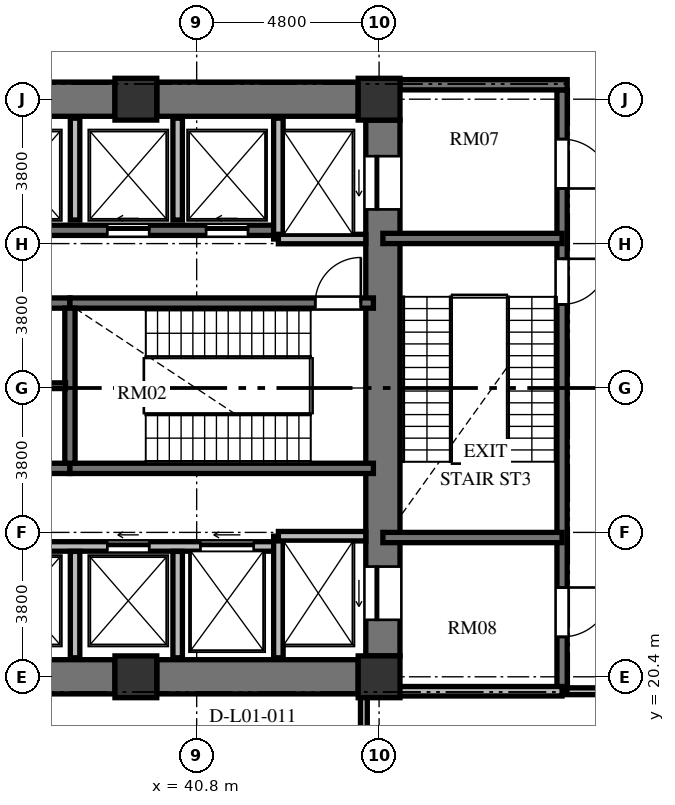
"""IFC4 building model, lengths in metres.
Left out: names, types, materials, properties, quantities, classifications, styles, units other than length and angle.
Written with IfcOpenShell. Run it as: python <this file> out.ifc"""

import sys

from ifc_helpers import new_model, si_unit, direction, frame, frame_2d, origin, origin_2d, place, context, subcontext, project, spatial, rectangle, extrude, element, fill, save


model = new_model("IFC4")
c1 = context("Model", 3, precision=1e-05, world=origin(), true_north=direction((0.0, 1.0)))
c2 = subcontext(c1, "Body", "Model", "MODEL_VIEW")
j1 = project(units=[si_unit("LENGTHUNIT", "METRE"), si_unit("PLANEANGLEUNIT", "RADIAN")], contexts=[c1])
p1 = place(None, origin())
s1 = spatial("IfcSite", under=j1, at=p1, CompositionType="ELEMENT")
p2 = place(p1, origin())
s2 = spatial("IfcBuilding", under=s1, at=p2, CompositionType="ELEMENT")
p3 = place(p2, frame((0.0, 0.0, 6.0)))
s3 = spatial("IfcBuildingStorey", under=s2, at=p3, CompositionType="ELEMENT", Elevation=6.0)
for number, where, z_axis, x_axis in (
    (1, (39.2, 20.4, 0.0), (0.0, 0.0, 1.0), (1.0, 0.0, 0.0)),
    (2, (45.6, 20.4, 0.0), (0.0, 0.0, 1.0), (1.0, 0.0, 0.0)),
    (3, (45.6, 35.6, 0.0), (0.0, 0.0, 1.0), (1.0, 0.0, 0.0)),
    (4, (39.2, 35.6, 0.0), (0.0, 0.0, 1.0), (1.0, 0.0, 0.0)),
):
    element("IfcColumn", number, at=place(p3, frame(where, z_axis=z_axis, x_axis=x_axis)), inside=s3, PredefinedType="COLUMN", context=c2, shape_type="SweptSolid", body=[
        extrude(rectangle(XDim=1.1, YDim=1.1, at=origin_2d()), origin(), (0.0, 0.0, 1.0), 4.8),
    ])
p4 = place(p3, frame((45.7, 20.95, 0.0), z_axis=(0.0, 0.0, 1.0), x_axis=(0.0, 1.0, 0.0)))
e5 = element("IfcWall", 5, at=p4, inside=s3, PredefinedType="SHEAR", context=c2, shape_type="SweptSolid", body=[
    extrude(rectangle(XDim=14.1, YDim=0.9, at=frame_2d((7.05, 0.0))), origin(), (0.0, 0.0, 1.0), 4.8),
])
p5 = place(p4, frame((11.75, 0.0, 0.0)))
e6 = element("IfcOpeningElement", 6, at=p5, cuts=e5, PredefinedType="OPENING", context=c2, shape_type="SweptSolid", body=[
    extrude(rectangle(XDim=1.4, YDim=2.3, at=frame_2d((0.7, 1.15))), frame((0.0, 0.46, 0.0), z_axis=(0.0, -1.0, 0.0), x_axis=(1.0, 0.0, 0.0)), (0.0, 0.0, 1.0), 0.92),
])
p6 = place(p4, frame((0.95, 0.0, 0.0)))
e7 = element("IfcOpeningElement", 7, at=p6, cuts=e5, PredefinedType="OPENING", context=c2, shape_type="SweptSolid", body=[
    extrude(rectangle(XDim=1.4, YDim=2.3, at=frame_2d((0.7, 1.15))), frame((0.0, 0.46, 0.0), z_axis=(0.0, -1.0, 0.0), x_axis=(1.0, 0.0, 0.0)), (0.0, 0.0, 1.0), 0.92),
])
for number, where, z_axis, x_axis in (
    (8, (33.35, 20.4, 0.0), (0.0, 0.0, 1.0), (1.0, 0.0, 0.0)),
    (9, (33.35, 35.6, 0.0), (0.0, 0.0, 1.0), (1.0, 0.0, 0.0)),
):
    element("IfcWall", number, at=place(p3, frame(where, z_axis=z_axis, x_axis=x_axis)), inside=s3, PredefinedType="SHEAR", context=c2, shape_type="SweptSolid", body=[
        extrude(rectangle(XDim=5.3, YDim=0.9, at=frame_2d((2.65, 0.0))), origin(), (0.0, 0.0, 1.0), 4.8),
    ])
for number, where, z_axis, x_axis in (
    (10, (39.75, 20.4, 0.0), (0.0, 0.0, 1.0), (1.0, 0.0, 0.0)),
    (11, (39.75, 35.6, 0.0), (0.0, 0.0, 1.0), (1.0, 0.0, 0.0)),
):
    element("IfcWall", number, at=place(p3, frame(where, z_axis=z_axis, x_axis=x_axis)), inside=s3, PredefinedType="SHEAR", context=c2, shape_type="SweptSolid", body=[
        extrude(rectangle(XDim=5.3, YDim=0.9, at=frame_2d((2.65, 0.0))), origin(), (0.0, 0.0, 1.0), 4.8),
    ])
p7 = place(p3, frame((34.535, 30.235, 0.0), z_axis=(0.0, 0.0, 1.0), x_axis=(1.0, 0.0, 0.0)))
e12 = element("IfcWall", 12, at=p7, inside=s3, PredefinedType="SHEAR", context=c2, shape_type="SweptSolid", body=[
    extrude(rectangle(XDim=2.93, YDim=0.27, at=frame_2d((1.465, 0.0))), origin(), (0.0, 0.0, 1.0), 4.8),
])
p8 = place(p7, frame((0.915, 0.0, 0.0)))
e13 = element("IfcOpeningElement", 13, at=p8, cuts=e12, PredefinedType="OPENING", context=c2, shape_type="SweptSolid", body=[
    extrude(rectangle(XDim=1.1, YDim=2.15, at=frame_2d((0.55, 1.075))), frame((0.0, 0.145, 0.0), z_axis=(0.0, -1.0, 0.0), x_axis=(1.0, 0.0, 0.0)), (0.0, 0.0, 1.0), 0.29),
])
p9 = place(p3, frame((37.465, 30.235, 0.0), z_axis=(0.0, 0.0, 1.0), x_axis=(1.0, 0.0, 0.0)))
e14 = element("IfcWall", 14, at=p9, inside=s3, PredefinedType="SHEAR", context=c2, shape_type="SweptSolid", body=[
    extrude(rectangle(XDim=7.985, YDim=0.27, at=frame_2d((3.992, 0.0))), origin(), (0.0, 0.0, 1.0), 4.8),
])
p10 = place(p9, frame((6.455, 0.0, 0.0)))
e15 = element("IfcOpeningElement", 15, at=p10, cuts=e14, PredefinedType="OPENING", context=c2, shape_type="SweptSolid", body=[
    extrude(rectangle(XDim=1.2, YDim=2.15, at=frame_2d((0.6, 1.075))), frame((0.0, 0.145, 0.0), z_axis=(0.0, -1.0, 0.0), x_axis=(1.0, 0.0, 0.0)), (0.0, 0.0, 1.0), 0.29),
])
p11 = place(p3, frame((34.535, 25.885, 0.0), z_axis=(0.0, 0.0, 1.0), x_axis=(1.0, 0.0, 0.0)))
e16 = element("IfcWall", 16, at=p11, inside=s3, PredefinedType="SHEAR", context=c2, shape_type="SweptSolid", body=[
    extrude(rectangle(XDim=2.93, YDim=0.27, at=frame_2d((1.465, 0.0))), origin(), (0.0, 0.0, 1.0), 4.8),
])
p12 = place(p11, frame((0.94, 0.0, 0.0)))
e17 = element("IfcOpeningElement", 17, at=p12, cuts=e16, PredefinedType="OPENING", context=c2, shape_type="SweptSolid", body=[
    extrude(rectangle(XDim=1.05, YDim=2.15, at=frame_2d((0.525, 1.075))), frame((0.0, 0.145, 0.0), z_axis=(0.0, -1.0, 0.0), x_axis=(1.0, 0.0, 0.0)), (0.0, 0.0, 1.0), 0.29),
])
p13 = place(p3, frame((37.465, 25.885, 0.0), z_axis=(0.0, 0.0, 1.0), x_axis=(1.0, 0.0, 0.0)))
e18 = element("IfcWall", 18, at=p13, inside=s3, PredefinedType="SHEAR", context=c2, shape_type="SweptSolid", body=[
    extrude(rectangle(XDim=7.985, YDim=0.27, at=frame_2d((3.992, 0.0))), origin(), (0.0, 0.0, 1.0), 4.8),
])
p14 = place(p3, frame((37.465, 26.02, 0.0), z_axis=(0.0, 0.0, 1.0), x_axis=(0.0, 1.0, 0.0)))
e19 = element("IfcWall", 19, at=p14, inside=s3, PredefinedType="SHEAR", context=c2, shape_type="SweptSolid", body=[
    extrude(rectangle(XDim=4.08, YDim=0.27, at=frame_2d((2.04, 0.0))), origin(), (0.0, 0.0, 1.0), 4.8),
])
p15 = place(p3, frame((34.65, 28.06, 0.0), z_axis=(0.0, 0.0, 1.0), x_axis=(1.0, 0.0, 0.0)))
e20 = element("IfcWall", 20, at=p15, inside=s3, PredefinedType="PARTITIONING", context=c2, shape_type="SweptSolid", body=[
    extrude(rectangle(XDim=2.7, YDim=0.15, at=frame_2d((1.35, 0.0))), origin(), (0.0, 0.0, 1.0), 4.52),
])
p16 = place(p3, frame((26.55, 32.15, 0.0), z_axis=(0.0, 0.0, 1.0), x_axis=(1.0, 0.0, 0.0)))
e21 = element("IfcWall", 21, at=p16, inside=s3, PredefinedType="SHEAR", context=c2, shape_type="SweptSolid", body=[
    extrude(rectangle(XDim=16.4, YDim=0.27, at=frame_2d((8.2, 0.0))), origin(), (0.0, 0.0, 1.0), 4.8),
])
p17 = place(p16, frame((1.1, 0.0, 0.0)))
e22 = element("IfcOpeningElement", 22, at=p17, cuts=e21, PredefinedType="OPENING", context=c2, shape_type="SweptSolid", body=[
    extrude(rectangle(XDim=1.1, YDim=2.2, at=frame_2d((0.55, 1.1))), frame((0.0, 0.145, 0.0), z_axis=(0.0, -1.0, 0.0), x_axis=(1.0, 0.0, 0.0)), (0.0, 0.0, 1.0), 0.29),
])
p18 = place(p16, frame((3.7, 0.0, 0.0)))
e23 = element("IfcOpeningElement", 23, at=p18, cuts=e21, PredefinedType="OPENING", context=c2, shape_type="SweptSolid", body=[
    extrude(rectangle(XDim=1.1, YDim=2.2, at=frame_2d((0.55, 1.1))), frame((0.0, 0.145, 0.0), z_axis=(0.0, -1.0, 0.0), x_axis=(1.0, 0.0, 0.0)), (0.0, 0.0, 1.0), 0.29),
])
p19 = place(p16, frame((6.5, 0.0, 0.0)))
e24 = element("IfcOpeningElement", 24, at=p19, cuts=e21, PredefinedType="OPENING", context=c2, shape_type="SweptSolid", body=[
    extrude(rectangle(XDim=1.1, YDim=2.2, at=frame_2d((0.55, 1.1))), frame((0.0, 0.145, 0.0), z_axis=(0.0, -1.0, 0.0), x_axis=(1.0, 0.0, 0.0)), (0.0, 0.0, 1.0), 0.29),
])
p20 = place(p16, frame((9.1, 0.0, 0.0)))
e25 = element("IfcOpeningElement", 25, at=p20, cuts=e21, PredefinedType="OPENING", context=c2, shape_type="SweptSolid", body=[
    extrude(rectangle(XDim=1.1, YDim=2.2, at=frame_2d((0.55, 1.1))), frame((0.0, 0.145, 0.0), z_axis=(0.0, -1.0, 0.0), x_axis=(1.0, 0.0, 0.0)), (0.0, 0.0, 1.0), 0.29),
])
p21 = place(p16, frame((11.9, 0.0, 0.0)))
e26 = element("IfcOpeningElement", 26, at=p21, cuts=e21, PredefinedType="OPENING", context=c2, shape_type="SweptSolid", body=[
    extrude(rectangle(XDim=1.1, YDim=2.2, at=frame_2d((0.55, 1.1))), frame((0.0, 0.145, 0.0), z_axis=(0.0, -1.0, 0.0), x_axis=(1.0, 0.0, 0.0)), (0.0, 0.0, 1.0), 0.29),
])
p22 = place(p16, frame((14.5, 0.0, 0.0)))
e27 = element("IfcOpeningElement", 27, at=p22, cuts=e21, PredefinedType="OPENING", context=c2, shape_type="SweptSolid", body=[
    extrude(rectangle(XDim=1.1, YDim=2.2, at=frame_2d((0.55, 1.1))), frame((0.0, 0.145, 0.0), z_axis=(0.0, -1.0, 0.0), x_axis=(1.0, 0.0, 0.0)), (0.0, 0.0, 1.0), 0.29),
])
p23 = place(p3, frame((26.75, 23.83, 0.0), z_axis=(0.0, 0.0, 1.0), x_axis=(1.0, 0.0, 0.0)))
e28 = element("IfcWall", 28, at=p23, inside=s3, PredefinedType="SOLIDWALL", context=c2, shape_type="SweptSolid", body=[
    extrude(rectangle(XDim=16.2, YDim=0.25, at=frame_2d((8.1, 0.0))), origin(), (0.0, 0.0, 1.0), 4.52),
])
p24 = place(p23, frame((0.9, 0.0, 0.0)))
e29 = element("IfcOpeningElement", 29, at=p24, cuts=e28, PredefinedType="OPENING", context=c2, shape_type="SweptSolid", body=[
    extrude(rectangle(XDim=1.1, YDim=2.2, at=frame_2d((0.55, 1.1))), frame((0.0, 0.135, 0.0), z_axis=(0.0, -1.0, 0.0), x_axis=(1.0, 0.0, 0.0)), (0.0, 0.0, 1.0), 0.27),
])
p25 = place(p23, frame((3.5, 0.0, 0.0)))
e30 = element("IfcOpeningElement", 30, at=p25, cuts=e28, PredefinedType="OPENING", context=c2, shape_type="SweptSolid", body=[
    extrude(rectangle(XDim=1.1, YDim=2.2, at=frame_2d((0.55, 1.1))), frame((0.0, 0.135, 0.0), z_axis=(0.0, -1.0, 0.0), x_axis=(1.0, 0.0, 0.0)), (0.0, 0.0, 1.0), 0.27),
])
p26 = place(p23, frame((6.3, 0.0, 0.0)))
e31 = element("IfcOpeningElement", 31, at=p26, cuts=e28, PredefinedType="OPENING", context=c2, shape_type="SweptSolid", body=[
    extrude(rectangle(XDim=1.1, YDim=2.2, at=frame_2d((0.55, 1.1))), frame((0.0, 0.135, 0.0), z_axis=(0.0, -1.0, 0.0), x_axis=(1.0, 0.0, 0.0)), (0.0, 0.0, 1.0), 0.27),
])
p27 = place(p23, frame((8.9, 0.0, 0.0)))
e32 = element("IfcOpeningElement", 32, at=p27, cuts=e28, PredefinedType="OPENING", context=c2, shape_type="SweptSolid", body=[
    extrude(rectangle(XDim=1.1, YDim=2.2, at=frame_2d((0.55, 1.1))), frame((0.0, 0.135, 0.0), z_axis=(0.0, -1.0, 0.0), x_axis=(1.0, 0.0, 0.0)), (0.0, 0.0, 1.0), 0.27),
])
p28 = place(p23, frame((11.7, 0.0, 0.0)))
e33 = element("IfcOpeningElement", 33, at=p28, cuts=e28, PredefinedType="OPENING", context=c2, shape_type="SweptSolid", body=[
    extrude(rectangle(XDim=1.1, YDim=2.2, at=frame_2d((0.55, 1.1))), frame((0.0, 0.135, 0.0), z_axis=(0.0, -1.0, 0.0), x_axis=(1.0, 0.0, 0.0)), (0.0, 0.0, 1.0), 0.27),
])
p29 = place(p23, frame((14.15, 0.0, 0.0)))
e34 = element("IfcOpeningElement", 34, at=p29, cuts=e28, PredefinedType="OPENING", context=c2, shape_type="SweptSolid", body=[
    extrude(rectangle(XDim=1.4, YDim=2.3, at=frame_2d((0.7, 1.15))), frame((0.0, 0.135, 0.0), z_axis=(0.0, -1.0, 0.0), x_axis=(1.0, 0.0, 0.0)), (0.0, 0.0, 1.0), 0.27),
])
p30 = place(p3, frame((42.95, 31.92, 0.0), z_axis=(0.0, 0.0, 1.0), x_axis=(0.0, 1.0, 0.0)))
e35 = element("IfcWall", 35, at=p30, inside=s3, PredefinedType="SOLIDWALL", context=c2, shape_type="SweptSolid", body=[
    extrude(rectangle(XDim=3.18, YDim=0.25, at=frame_2d((1.59, 0.0))), origin(), (0.0, 0.0, 1.0), 4.52),
])
p31 = place(p3, frame((42.95, 31.92, 0.0), z_axis=(0.0, 0.0, 1.0), x_axis=(1.0, 0.0, 0.0)))
e36 = element("IfcWall", 36, at=p31, inside=s3, PredefinedType="SOLIDWALL", context=c2, shape_type="SweptSolid", body=[
    extrude(rectangle(XDim=2.3, YDim=0.25, at=frame_2d((1.15, 0.0))), origin(), (0.0, 0.0, 1.0), 4.52),
])
p32 = place(p3, frame((42.95, 20.9, 0.0), z_axis=(0.0, 0.0, 1.0), x_axis=(0.0, 1.0, 0.0)))
e37 = element("IfcWall", 37, at=p32, inside=s3, PredefinedType="SOLIDWALL", context=c2, shape_type="SweptSolid", body=[
    extrude(rectangle(XDim=3.2, YDim=0.25, at=frame_2d((1.6, 0.0))), origin(), (0.0, 0.0, 1.0), 4.52),
])
p33 = place(p3, frame((42.95, 24.1, 0.0), z_axis=(0.0, 0.0, 1.0), x_axis=(1.0, 0.0, 0.0)))
e38 = element("IfcWall", 38, at=p33, inside=s3, PredefinedType="SOLIDWALL", context=c2, shape_type="SweptSolid", body=[
    extrude(rectangle(XDim=2.3, YDim=0.25, at=frame_2d((1.15, 0.0))), origin(), (0.0, 0.0, 1.0), 4.52),
])
p34 = place(p3, frame((37.6, 32.42, 0.0), z_axis=(0.0, 0.0, 1.0), x_axis=(0.0, 1.0, 0.0)))
e39 = element("IfcWall", 39, at=p34, inside=s3, PredefinedType="SOLIDWALL", context=c2, shape_type="SweptSolid", body=[
    extrude(rectangle(XDim=2.68, YDim=0.25, at=frame_2d((1.34, 0.0))), origin(), (0.0, 0.0, 1.0), 4.52),
])
p35 = place(p3, frame((37.6, 20.9, 0.0), z_axis=(0.0, 0.0, 1.0), x_axis=(0.0, 1.0, 0.0)))
e40 = element("IfcWall", 40, at=p35, inside=s3, PredefinedType="SOLIDWALL", context=c2, shape_type="SweptSolid", body=[
    extrude(rectangle(XDim=2.8, YDim=0.25, at=frame_2d((1.4, 0.0))), origin(), (0.0, 0.0, 1.0), 4.52),
])
p36 = place(p3, frame((40.3, 32.42, 0.0), z_axis=(0.0, 0.0, 1.0), x_axis=(0.0, 1.0, 0.0)))
e41 = element("IfcWall", 41, at=p36, inside=s3, PredefinedType="SOLIDWALL", context=c2, shape_type="SweptSolid", body=[
    extrude(rectangle(XDim=2.68, YDim=0.25, at=frame_2d((1.34, 0.0))), origin(), (0.0, 0.0, 1.0), 4.52),
])
p37 = place(p3, frame((40.3, 20.9, 0.0), z_axis=(0.0, 0.0, 1.0), x_axis=(0.0, 1.0, 0.0)))
e42 = element("IfcWall", 42, at=p37, inside=s3, PredefinedType="SOLIDWALL", context=c2, shape_type="SweptSolid", body=[
    extrude(rectangle(XDim=2.8, YDim=0.25, at=frame_2d((1.4, 0.0))), origin(), (0.0, 0.0, 1.0), 4.52),
])
p38 = place(p3, frame((50.415, 35.845, 0.0), z_axis=(0.0, 0.0, 1.0), x_axis=(0.0, -1.0, 0.0)))
e43 = element("IfcWall", 43, at=p38, inside=s3, PredefinedType="SHEAR", context=c2, shape_type="SweptSolid", body=[
    extrude(rectangle(XDim=15.825, YDim=0.27, at=frame_2d((7.913, 0.0))), origin(), (0.0, 0.0, 1.0), 4.8),
])
p39 = place(p38, frame((4.445, 0.0, 0.0)))
e44 = element("IfcOpeningElement", 44, at=p39, cuts=e43, PredefinedType="OPENING", context=c2, shape_type="SweptSolid", body=[
    extrude(rectangle(XDim=1.2, YDim=2.15, at=frame_2d((0.6, 1.075))), frame((0.0, 0.145, 0.0), z_axis=(0.0, -1.0, 0.0), x_axis=(1.0, 0.0, 0.0)), (0.0, 0.0, 1.0), 0.29),
])
p40 = place(p38, frame((1.295, 0.0, 0.0)))
e45 = element("IfcOpeningElement", 45, at=p40, cuts=e43, PredefinedType="OPENING", context=c2, shape_type="SweptSolid", body=[
    extrude(rectangle(XDim=1.3, YDim=2.2, at=frame_2d((0.65, 1.1))), frame((0.0, 0.145, 0.0), z_axis=(0.0, -1.0, 0.0), x_axis=(1.0, 0.0, 0.0)), (0.0, 0.0, 1.0), 0.29),
])
p41 = place(p38, frame((13.095, 0.0, 0.0)))
e46 = element("IfcOpeningElement", 46, at=p41, cuts=e43, PredefinedType="OPENING", context=c2, shape_type="SweptSolid", body=[
    extrude(rectangle(XDim=1.3, YDim=2.2, at=frame_2d((0.65, 1.1))), frame((0.0, 0.145, 0.0), z_axis=(0.0, -1.0, 0.0), x_axis=(1.0, 0.0, 0.0)), (0.0, 0.0, 1.0), 0.29),
])
p42 = place(p3, frame((46.15, 35.98, 0.0), z_axis=(0.0, 0.0, 1.0), x_axis=(1.0, 0.0, 0.0)))
e47 = element("IfcWall", 47, at=p42, inside=s3, PredefinedType="SHEAR", context=c2, shape_type="SweptSolid", body=[
    extrude(rectangle(XDim=4.4, YDim=0.27, at=frame_2d((2.2, 0.0))), origin(), (0.0, 0.0, 1.0), 4.8),
])
for number, where, z_axis, x_axis in (
    (48, (45.7, 31.935, 0.0), (0.0, 0.0, 1.0), (1.0, 0.0, 0.0)),
    (49, (45.7, 24.065, 0.0), (0.0, 0.0, 1.0), (1.0, 0.0, 0.0)),
):
    element("IfcWall", number, at=place(p3, frame(where, z_axis=z_axis, x_axis=x_axis)), inside=s3, PredefinedType="SHEAR", context=c2, shape_type="SweptSolid", body=[
        extrude(rectangle(XDim=4.715, YDim=0.27, at=frame_2d((2.357, 0.0))), origin(), (0.0, 0.0, 1.0), 4.8),
    ])
p43 = place(p3, frame((45.7, 20.02, 0.0), z_axis=(0.0, 0.0, 1.0), x_axis=(1.0, 0.0, 0.0)))
e50 = element("IfcWall", 50, at=p43, inside=s3, PredefinedType="SOLIDWALL", context=c2, shape_type="SweptSolid", body=[
    extrude(rectangle(XDim=4.715, YDim=0.25, at=frame_2d((2.357, 0.0))), origin(), (0.0, 0.0, 1.0), 4.52),
])
p44 = place(p3, frame((53.19, 20.02, 0.0), z_axis=(0.0, 0.0, 1.0), x_axis=(-1.0, 0.0, 0.0)))
e51 = element("IfcWall", 51, at=p44, inside=s3, PredefinedType="PARTITIONING", context=c2, shape_type="SweptSolid", body=[
    extrude(rectangle(XDim=2.65, YDim=0.18, at=frame_2d((1.325, 0.0))), origin(), (0.0, 0.0, 1.0), 4.52),
])
p45 = place(p3, frame((45.2, 19.91, 0.0), z_axis=(0.0, 0.0, 1.0), x_axis=(0.0, -1.0, 0.0)))
e52 = element("IfcWall", 52, at=p45, inside=s3, PredefinedType="PARTITIONING", context=c2, shape_type="SweptSolid", body=[
    extrude(rectangle(XDim=2.55, YDim=0.18, at=frame_2d((1.275, 0.0))), origin(), (0.0, 0.0, 1.0), 4.52),
])
p46 = place(p10, origin())
e53 = element("IfcDoor", 53, at=p46, inside=s3, OperationType="SINGLE_SWING_RIGHT", PredefinedType="DOOR", context=c2, shape_type="SweptSolid", body=[
    extrude(rectangle(XDim=1.2, YDim=2.15, at=frame_2d((0.6, 1.075))), frame((0.0, 0.025, 0.0), z_axis=(0.0, -1.0, 0.0), x_axis=(1.0, 0.0, 0.0)), (0.0, 0.0, 1.0), 0.05),
])
fill(e15, e53)
p47 = place(p21, origin())
e54 = element("IfcDoor", 54, at=p47, inside=s3, OperationType="SLIDING_TO_LEFT", PredefinedType="DOOR", context=c2, shape_type="SweptSolid", body=[
    extrude(rectangle(XDim=1.1, YDim=2.2, at=frame_2d((0.55, 1.1))), frame((0.0, 0.025, 0.0), z_axis=(0.0, -1.0, 0.0), x_axis=(1.0, 0.0, 0.0)), (0.0, 0.0, 1.0), 0.05),
])
fill(e26, e54)
p48 = place(p22, origin())
e55 = element("IfcDoor", 55, at=p48, inside=s3, OperationType="SLIDING_TO_LEFT", PredefinedType="DOOR", context=c2, shape_type="SweptSolid", body=[
    extrude(rectangle(XDim=1.1, YDim=2.2, at=frame_2d((0.55, 1.1))), frame((0.0, 0.025, 0.0), z_axis=(0.0, -1.0, 0.0), x_axis=(1.0, 0.0, 0.0)), (0.0, 0.0, 1.0), 0.05),
])
fill(e27, e55)
p49 = place(p28, origin())
e56 = element("IfcDoor", 56, at=p49, inside=s3, OperationType="SLIDING_TO_LEFT", PredefinedType="DOOR", context=c2, shape_type="SweptSolid", body=[
    extrude(rectangle(XDim=1.1, YDim=2.2, at=frame_2d((0.55, 1.1))), frame((0.0, 0.025, 0.0), z_axis=(0.0, -1.0, 0.0), x_axis=(1.0, 0.0, 0.0)), (0.0, 0.0, 1.0), 0.05),
])
fill(e33, e56)
p50 = place(p5, origin())
e57 = element("IfcDoor", 57, at=p50, inside=s3, OperationType="SLIDING_TO_LEFT", PredefinedType="DOOR", context=c2, shape_type="SweptSolid", body=[
    extrude(rectangle(XDim=1.4, YDim=2.3, at=frame_2d((0.7, 1.15))), frame((0.0, 0.025, 0.0), z_axis=(0.0, -1.0, 0.0), x_axis=(1.0, 0.0, 0.0)), (0.0, 0.0, 1.0), 0.05),
])
fill(e6, e57)
p51 = place(p6, origin())
e58 = element("IfcDoor", 58, at=p51, inside=s3, OperationType="SLIDING_TO_LEFT", PredefinedType="DOOR", context=c2, shape_type="SweptSolid", body=[
    extrude(rectangle(XDim=1.4, YDim=2.3, at=frame_2d((0.7, 1.15))), frame((0.0, 0.025, 0.0), z_axis=(0.0, -1.0, 0.0), x_axis=(1.0, 0.0, 0.0)), (0.0, 0.0, 1.0), 0.05),
])
fill(e7, e58)
p52 = place(p29, origin())
e59 = element("IfcDoor", 59, at=p52, inside=s3, OperationType="SLIDING_TO_LEFT", PredefinedType="DOOR", context=c2, shape_type="SweptSolid", body=[
    extrude(rectangle(XDim=1.4, YDim=2.3, at=frame_2d((0.7, 1.15))), frame((0.0, 0.025, 0.0), z_axis=(0.0, -1.0, 0.0), x_axis=(1.0, 0.0, 0.0)), (0.0, 0.0, 1.0), 0.05),
])
fill(e34, e59)
p53 = place(p39, origin())
e60 = element("IfcDoor", 60, at=p53, inside=s3, OperationType="SINGLE_SWING_LEFT", PredefinedType="DOOR", context=c2, shape_type="SweptSolid", body=[
    extrude(rectangle(XDim=1.2, YDim=2.15, at=frame_2d((0.6, 1.075))), frame((0.0, 0.025, 0.0), z_axis=(0.0, -1.0, 0.0), x_axis=(1.0, 0.0, 0.0)), (0.0, 0.0, 1.0), 0.05),
])
fill(e44, e60)
p54 = place(p40, origin())
e61 = element("IfcDoor", 61, at=p54, inside=s3, OperationType="SINGLE_SWING_RIGHT", PredefinedType="DOOR", context=c2, shape_type="SweptSolid", body=[
    extrude(rectangle(XDim=1.3, YDim=2.2, at=frame_2d((0.65, 1.1))), frame((0.0, 0.025, 0.0), z_axis=(0.0, -1.0, 0.0), x_axis=(1.0, 0.0, 0.0)), (0.0, 0.0, 1.0), 0.05),
])
fill(e45, e61)
p55 = place(p41, origin())
e62 = element("IfcDoor", 62, at=p55, inside=s3, OperationType="SINGLE_SWING_LEFT", PredefinedType="DOOR", context=c2, shape_type="SweptSolid", body=[
    extrude(rectangle(XDim=1.3, YDim=2.2, at=frame_2d((0.65, 1.1))), frame((0.0, 0.025, 0.0), z_axis=(0.0, -1.0, 0.0), x_axis=(1.0, 0.0, 0.0)), (0.0, 0.0, 1.0), 0.05),
])
fill(e46, e62)
save(model, sys.argv[1])
